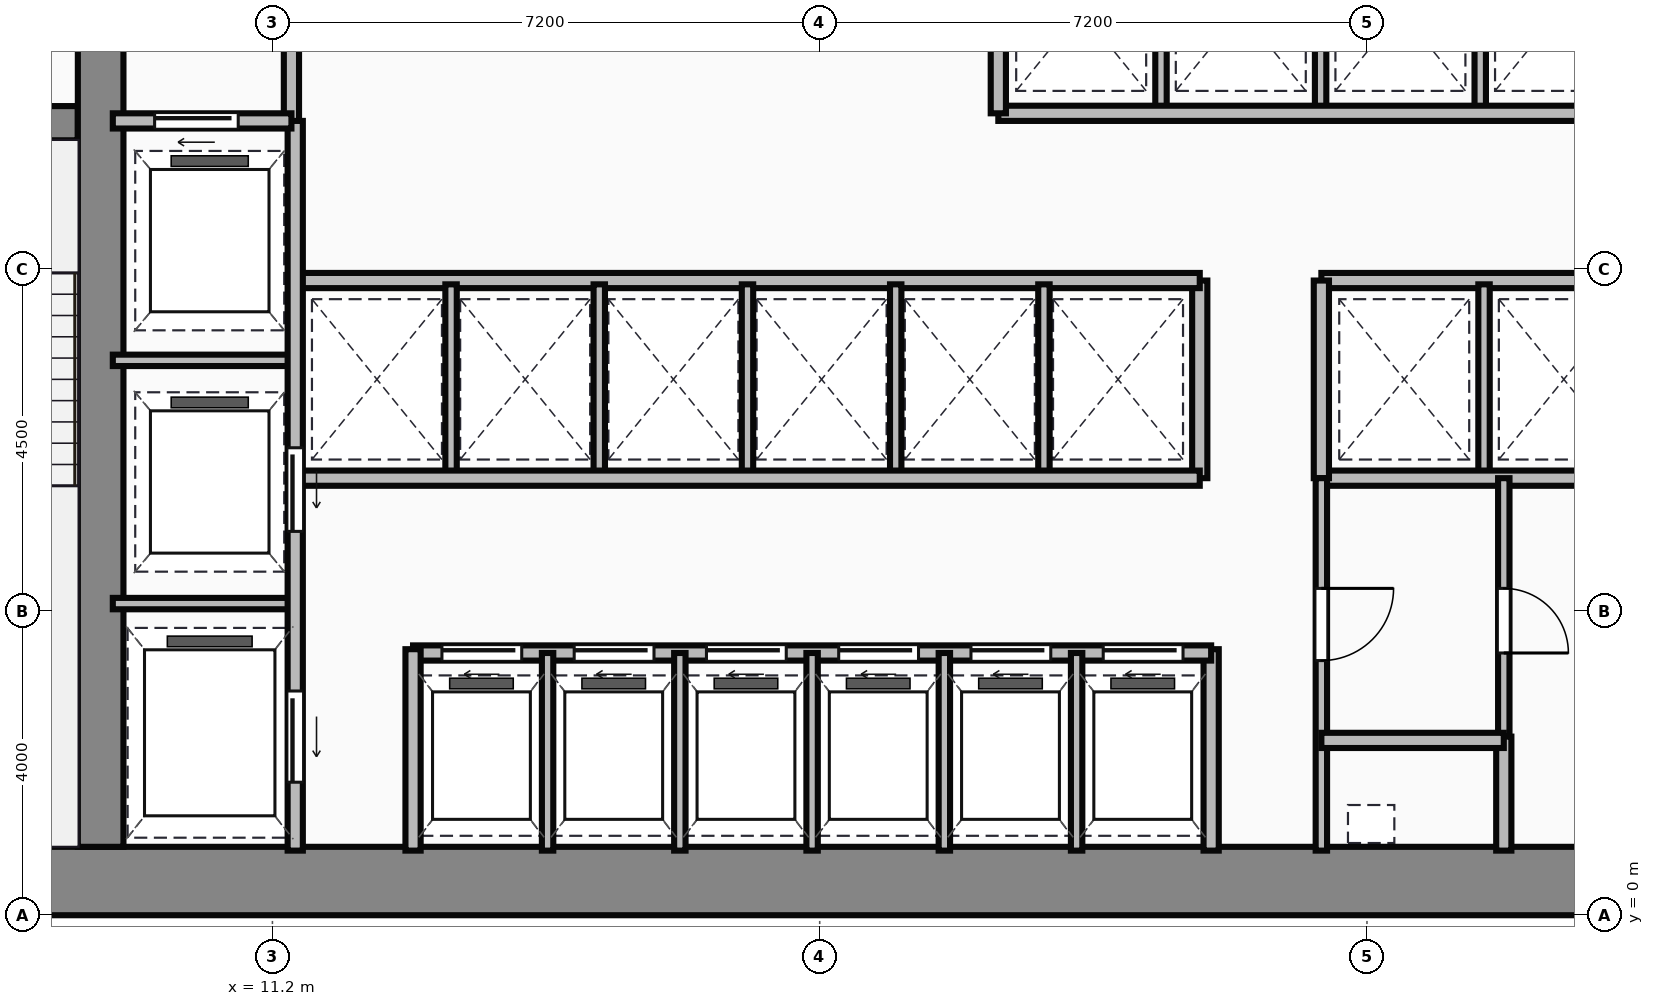
"""IFC4 building model, lengths in metres.
Left out: names, types, materials, properties, quantities, classifications, styles, units other than length and angle.
Written with IfcOpenShell. Run it as: python <this file> out.ifc"""

import sys

from ifc_helpers import new_model, si_unit, direction, frame, frame_2d, origin, place, context, subcontext, project, spatial, rectangle, extrude, source, transform, mapped, element, fill, save


model = new_model("IFC4")
c1 = context("Model", 3, precision=1e-05, world=origin(), true_north=direction((0.0, 1.0)))
c2 = subcontext(c1, "Body", "Model", "MODEL_VIEW")
j1 = project(units=[si_unit("LENGTHUNIT", "METRE"), si_unit("PLANEANGLEUNIT", "RADIAN")], contexts=[c1])
p1 = place(None, origin())
s1 = spatial("IfcSite", under=j1, at=p1, CompositionType="ELEMENT")
p2 = place(p1, origin())
s2 = spatial("IfcBuilding", under=s1, at=p2, CompositionType="ELEMENT")
p3 = place(p2, frame((0.0, 0.0, 36.15)))
s3 = spatial("IfcBuildingStorey", under=s2, at=p3, CompositionType="ELEMENT", Elevation=36.15)
m1 = source(origin(), c2, "Body", "SweptSolid", [
    extrude(rectangle(XDim=29.5, YDim=0.9, at=frame_2d((14.75, 0.0))), origin(), (0.0, 0.0, 1.0), 3.65),
])
p4 = place(p3, frame((4.5, 0.45, 0.0), z_axis=(0.0, 0.0, 1.0), x_axis=(1.0, 0.0, 0.0)))
e1 = element("IfcWall", 1, at=p4, inside=s3, PredefinedType="SHEAR", context=c2, shape_type="MappedRepresentation", body=[
    mapped(m1, transform((0.0, 0.0, 0.0))),
])
m2 = source(origin(), c2, "Body", "SweptSolid", [
    extrude(rectangle(XDim=12.2, YDim=0.6, at=frame_2d((6.1, 0.0))), origin(), (0.0, 0.0, 1.0), 3.65),
])
p5 = place(p3, frame((8.94, 0.9, 0.0), z_axis=(0.0, 0.0, 1.0), x_axis=(0.0, 1.0, 0.0)))
e2 = element("IfcWall", 2, at=p5, inside=s3, PredefinedType="SHEAR", context=c2, shape_type="MappedRepresentation", body=[
    mapped(m2, transform((0.0, 0.0, 0.0))),
])
m3 = source(origin(), c2, "Body", "SweptSolid", [
    extrude(rectangle(XDim=3.39, YDim=0.45, at=frame_2d((1.695, 0.0))), origin(), (0.0, 0.0, 1.0), 3.65),
])
p6 = place(p3, frame((5.25, 10.42, 0.0), z_axis=(0.0, 0.0, 1.0), x_axis=(1.0, 0.0, 0.0)))
e3 = element("IfcWall", 3, at=p6, inside=s3, PredefinedType="SHEAR", context=c2, shape_type="MappedRepresentation", body=[
    mapped(m3, transform((0.0, 0.0, 0.0))),
])
p7 = place(p6, frame((1.05, 0.0, 0.0)))
e4 = element("IfcOpeningElement", 4, at=p7, cuts=e3, PredefinedType="OPENING", context=c2, shape_type="SweptSolid", body=[
    extrude(rectangle(XDim=1.1, YDim=2.15, at=frame_2d((0.55, 1.075))), frame((0.0, 0.235, 0.0), z_axis=(0.0, -1.0, 0.0), x_axis=(1.0, 0.0, 0.0)), (0.0, 0.0, 1.0), 0.47),
])
m4 = source(origin(), c2, "Body", "SweptSolid", [
    extrude(rectangle(XDim=3.18, YDim=0.2, at=frame_2d((1.59, 0.0))), origin(), (0.0, 0.0, 1.0), 3.4),
])
p8 = place(p3, frame((11.45, 10.42, 0.0), z_axis=(0.0, 0.0, 1.0), x_axis=(0.0, 1.0, 0.0)))
e5 = element("IfcWall", 5, at=p8, inside=s3, PredefinedType="PARTITIONING", context=c2, shape_type="MappedRepresentation", body=[
    mapped(m4, transform((0.0, 0.0, 0.0))),
])
m5 = source(origin(), c2, "Body", "SweptSolid", [
    extrude(rectangle(XDim=2.35, YDim=0.2, at=frame_2d((1.175, 0.0))), origin(), (0.0, 0.0, 1.0), 3.4),
])
p9 = place(p3, frame((9.1, 10.45, 0.0), z_axis=(0.0, 0.0, 1.0), x_axis=(1.0, 0.0, 0.0)))
e6 = element("IfcWall", 6, at=p9, inside=s3, PredefinedType="PARTITIONING", context=c2, shape_type="MappedRepresentation", body=[
    mapped(m5, transform((0.0, 0.0, 0.0))),
])
p10 = place(p9, frame((0.55, 0.0, 0.0)))
e7 = element("IfcOpeningElement", 7, at=p10, cuts=e6, PredefinedType="OPENING", context=c2, shape_type="SweptSolid", body=[
    extrude(rectangle(XDim=1.1, YDim=2.15, at=frame_2d((0.55, 1.075))), frame((0.0, 0.11, 0.0), z_axis=(0.0, -1.0, 0.0), x_axis=(1.0, 0.0, 0.0)), (0.0, 0.0, 1.0), 0.22),
])
m6 = source(origin(), c2, "Body", "SweptSolid", [
    extrude(rectangle(XDim=9.6, YDim=0.2, at=frame_2d((4.8, 0.0))), origin(), (0.0, 0.0, 1.0), 3.4),
])
p11 = place(p3, frame((11.5, 0.85, 0.0), z_axis=(0.0, 0.0, 1.0), x_axis=(0.0, 1.0, 0.0)))
e8 = element("IfcWall", 8, at=p11, inside=s3, PredefinedType="PARTITIONING", context=c2, shape_type="MappedRepresentation", body=[
    mapped(m6, transform((0.0, 0.0, 0.0))),
])
p12 = place(p11, frame((4.2, 0.0, 0.0)))
e9 = element("IfcOpeningElement", 9, at=p12, cuts=e8, PredefinedType="OPENING", context=c2, shape_type="SweptSolid", body=[
    extrude(rectangle(XDim=1.1, YDim=2.15, at=frame_2d((0.55, 1.075))), frame((0.0, 0.11, 0.0), z_axis=(0.0, -1.0, 0.0), x_axis=(1.0, 0.0, 0.0)), (0.0, 0.0, 1.0), 0.22),
])
p13 = place(p11, frame((0.9, 0.0, 0.0)))
e10 = element("IfcOpeningElement", 10, at=p13, cuts=e8, PredefinedType="OPENING", context=c2, shape_type="SweptSolid", body=[
    extrude(rectangle(XDim=1.2, YDim=2.15, at=frame_2d((0.6, 1.075))), frame((0.0, 0.11, 0.0), z_axis=(0.0, -1.0, 0.0), x_axis=(1.0, 0.0, 0.0)), (0.0, 0.0, 1.0), 0.22),
])
m7 = source(origin(), c2, "Body", "SweptSolid", [
    extrude(rectangle(XDim=2.4, YDim=0.15, at=frame_2d((1.2, 0.0))), origin(), (0.0, 0.0, 1.0), 3.4),
])
for number, where, z_axis, x_axis in (
    (11, (9.1, 4.1, 0.0), (0.0, 0.0, 1.0), (1.0, 0.0, 0.0)),
    (12, (9.1, 7.3, 0.0), (0.0, 0.0, 1.0), (1.0, 0.0, 0.0)),
):
    element("IfcWall", number, at=place(p3, frame(where, z_axis=z_axis, x_axis=x_axis)), inside=s3, PredefinedType="PARTITIONING", context=c2, shape_type="MappedRepresentation", body=[
        mapped(m7, transform((0.0, 0.0, 0.0))),
    ])
m8 = source(origin(), c2, "Body", "SweptSolid", [
    extrude(rectangle(XDim=2.65, YDim=0.2, at=frame_2d((1.325, 0.0))), origin(), (0.0, 0.0, 1.0), 3.4),
])
p14 = place(p3, frame((13.05, 0.85, 0.0), z_axis=(0.0, 0.0, 1.0), x_axis=(0.0, 1.0, 0.0)))
e13 = element("IfcWall", 13, at=p14, inside=s3, PredefinedType="PARTITIONING", context=c2, shape_type="MappedRepresentation", body=[
    mapped(m8, transform((0.0, 0.0, 0.0))),
])
m9 = source(origin(), c2, "Body", "SweptSolid", [
    extrude(rectangle(XDim=10.5, YDim=0.2, at=frame_2d((5.25, 0.0))), origin(), (0.0, 0.0, 1.0), 3.4),
])
p15 = place(p3, frame((13.05, 3.45, 0.0), z_axis=(0.0, 0.0, 1.0), x_axis=(1.0, 0.0, 0.0)))
e14 = element("IfcWall", 14, at=p15, inside=s3, PredefinedType="PARTITIONING", context=c2, shape_type="MappedRepresentation", body=[
    mapped(m9, transform((0.0, 0.0, 0.0))),
])
p16 = place(p15, frame((0.38, 0.0, 0.0)))
e15 = element("IfcOpeningElement", 15, at=p16, cuts=e14, PredefinedType="OPENING", context=c2, shape_type="SweptSolid", body=[
    extrude(rectangle(XDim=1.05, YDim=2.15, at=frame_2d((0.525, 1.075))), frame((0.0, 0.11, 0.0), z_axis=(0.0, -1.0, 0.0), x_axis=(1.0, 0.0, 0.0)), (0.0, 0.0, 1.0), 0.22),
])
p17 = place(p15, frame((2.12, 0.0, 0.0)))
e16 = element("IfcOpeningElement", 16, at=p17, cuts=e14, PredefinedType="OPENING", context=c2, shape_type="SweptSolid", body=[
    extrude(rectangle(XDim=1.05, YDim=2.15, at=frame_2d((0.525, 1.075))), frame((0.0, 0.11, 0.0), z_axis=(0.0, -1.0, 0.0), x_axis=(1.0, 0.0, 0.0)), (0.0, 0.0, 1.0), 0.22),
])
p18 = place(p15, frame((3.86, 0.0, 0.0)))
e17 = element("IfcOpeningElement", 17, at=p18, cuts=e14, PredefinedType="OPENING", context=c2, shape_type="SweptSolid", body=[
    extrude(rectangle(XDim=1.05, YDim=2.15, at=frame_2d((0.525, 1.075))), frame((0.0, 0.11, 0.0), z_axis=(0.0, -1.0, 0.0), x_axis=(1.0, 0.0, 0.0)), (0.0, 0.0, 1.0), 0.22),
])
p19 = place(p15, frame((5.6, 0.0, 0.0)))
e18 = element("IfcOpeningElement", 18, at=p19, cuts=e14, PredefinedType="OPENING", context=c2, shape_type="SweptSolid", body=[
    extrude(rectangle(XDim=1.05, YDim=2.15, at=frame_2d((0.525, 1.075))), frame((0.0, 0.11, 0.0), z_axis=(0.0, -1.0, 0.0), x_axis=(1.0, 0.0, 0.0)), (0.0, 0.0, 1.0), 0.22),
])
p20 = place(p15, frame((7.34, 0.0, 0.0)))
e19 = element("IfcOpeningElement", 19, at=p20, cuts=e14, PredefinedType="OPENING", context=c2, shape_type="SweptSolid", body=[
    extrude(rectangle(XDim=1.05, YDim=2.15, at=frame_2d((0.525, 1.075))), frame((0.0, 0.11, 0.0), z_axis=(0.0, -1.0, 0.0), x_axis=(1.0, 0.0, 0.0)), (0.0, 0.0, 1.0), 0.22),
])
p21 = place(p15, frame((9.08, 0.0, 0.0)))
e20 = element("IfcOpeningElement", 20, at=p21, cuts=e14, PredefinedType="OPENING", context=c2, shape_type="SweptSolid", body=[
    extrude(rectangle(XDim=1.05, YDim=2.15, at=frame_2d((0.525, 1.075))), frame((0.0, 0.11, 0.0), z_axis=(0.0, -1.0, 0.0), x_axis=(1.0, 0.0, 0.0)), (0.0, 0.0, 1.0), 0.22),
])
p22 = place(p3, frame((23.55, 0.85, 0.0), z_axis=(0.0, 0.0, 1.0), x_axis=(0.0, 1.0, 0.0)))
e21 = element("IfcWall", 21, at=p22, inside=s3, PredefinedType="PARTITIONING", context=c2, shape_type="MappedRepresentation", body=[
    mapped(m8, transform((0.0, 0.0, 0.0))),
])
m10 = source(origin(), c2, "Body", "SweptSolid", [
    extrude(rectangle(XDim=2.6, YDim=0.15, at=frame_2d((1.3, 0.0))), origin(), (0.0, 0.0, 1.0), 3.4),
])
for number, where, z_axis, x_axis in (
    (22, (14.82, 0.85, 0.0), (0.0, 0.0, 1.0), (0.0, 1.0, 0.0)),
    (23, (16.56, 0.85, 0.0), (0.0, 0.0, 1.0), (0.0, 1.0, 0.0)),
    (24, (18.3, 0.85, 0.0), (0.0, 0.0, 1.0), (0.0, 1.0, 0.0)),
    (25, (20.04, 0.85, 0.0), (0.0, 0.0, 1.0), (0.0, 1.0, 0.0)),
    (26, (21.78, 0.85, 0.0), (0.0, 0.0, 1.0), (0.0, 1.0, 0.0)),
):
    element("IfcWall", number, at=place(p3, frame(where, z_axis=z_axis, x_axis=x_axis)), inside=s3, PredefinedType="PARTITIONING", context=c2, shape_type="MappedRepresentation", body=[
        mapped(m10, transform((0.0, 0.0, 0.0))),
    ])
m11 = source(origin(), c2, "Body", "SweptSolid", [
    extrude(rectangle(XDim=11.85, YDim=0.2, at=frame_2d((5.925, 0.0))), origin(), (0.0, 0.0, 1.0), 3.4),
])
for number, where, z_axis, x_axis in (
    (27, (11.55, 5.75, 0.0), (0.0, 0.0, 1.0), (1.0, 0.0, 0.0)),
    (28, (11.55, 8.35, 0.0), (0.0, 0.0, 1.0), (1.0, 0.0, 0.0)),
):
    element("IfcWall", number, at=place(p3, frame(where, z_axis=z_axis, x_axis=x_axis)), inside=s3, PredefinedType="PARTITIONING", context=c2, shape_type="MappedRepresentation", body=[
        mapped(m11, transform((0.0, 0.0, 0.0))),
    ])
m12 = source(origin(), c2, "Body", "SweptSolid", [
    extrude(rectangle(XDim=2.6, YDim=0.2, at=frame_2d((1.3, 0.0))), origin(), (0.0, 0.0, 1.0), 3.4),
])
p23 = place(p3, frame((23.4, 5.75, 0.0), z_axis=(0.0, 0.0, 1.0), x_axis=(0.0, 1.0, 0.0)))
e29 = element("IfcWall", 29, at=p23, inside=s3, PredefinedType="PARTITIONING", context=c2, shape_type="MappedRepresentation", body=[
    mapped(m12, transform((0.0, 0.0, 0.0))),
])
m13 = source(origin(), c2, "Body", "SweptSolid", [
    extrude(rectangle(XDim=2.5, YDim=0.15, at=frame_2d((1.25, 0.0))), origin(), (0.0, 0.0, 1.0), 3.4),
])
for number, where, z_axis, x_axis in (
    (30, (13.55, 5.8, 0.0), (0.0, 0.0, 1.0), (0.0, 1.0, 0.0)),
    (31, (15.5, 5.8, 0.0), (0.0, 0.0, 1.0), (0.0, 1.0, 0.0)),
    (32, (17.45, 5.8, 0.0), (0.0, 0.0, 1.0), (0.0, 1.0, 0.0)),
    (33, (19.4, 5.8, 0.0), (0.0, 0.0, 1.0), (0.0, 1.0, 0.0)),
    (34, (21.35, 5.8, 0.0), (0.0, 0.0, 1.0), (0.0, 1.0, 0.0)),
):
    element("IfcWall", number, at=place(p3, frame(where, z_axis=z_axis, x_axis=x_axis)), inside=s3, PredefinedType="PARTITIONING", context=c2, shape_type="MappedRepresentation", body=[
        mapped(m13, transform((0.0, 0.0, 0.0))),
    ])
m14 = source(origin(), c2, "Body", "SweptSolid", [
    extrude(rectangle(XDim=8.8, YDim=0.2, at=frame_2d((4.4, 0.0))), origin(), (0.0, 0.0, 1.0), 3.4),
])
p24 = place(p3, frame((20.75, 10.55, 0.0), z_axis=(0.0, 0.0, 1.0), x_axis=(1.0, 0.0, 0.0)))
e35 = element("IfcWall", 35, at=p24, inside=s3, PredefinedType="PARTITIONING", context=c2, shape_type="MappedRepresentation", body=[
    mapped(m14, transform((0.0, 0.0, 0.0))),
])
m15 = source(origin(), c2, "Body", "SweptSolid", [
    extrude(rectangle(XDim=3.0, YDim=0.2, at=frame_2d((1.5, 0.0))), origin(), (0.0, 0.0, 1.0), 3.4),
])
p25 = place(p3, frame((20.75, 10.55, 0.0), z_axis=(0.0, 0.0, 1.0), x_axis=(0.0, 1.0, 0.0)))
e36 = element("IfcWall", 36, at=p25, inside=s3, PredefinedType="PARTITIONING", context=c2, shape_type="MappedRepresentation", body=[
    mapped(m15, transform((0.0, 0.0, 0.0))),
])
m16 = source(origin(), c2, "Body", "SweptSolid", [
    extrude(rectangle(XDim=2.85, YDim=0.15, at=frame_2d((1.425, 0.0))), origin(), (0.0, 0.0, 1.0), 3.4),
])
for number, where, z_axis, x_axis in (
    (37, (22.89, 10.6, 0.0), (0.0, 0.0, 1.0), (0.0, 1.0, 0.0)),
    (38, (24.99, 10.6, 0.0), (0.0, 0.0, 1.0), (0.0, 1.0, 0.0)),
    (39, (27.09, 10.6, 0.0), (0.0, 0.0, 1.0), (0.0, 1.0, 0.0)),
):
    element("IfcWall", number, at=place(p3, frame(where, z_axis=z_axis, x_axis=x_axis)), inside=s3, PredefinedType="PARTITIONING", context=c2, shape_type="MappedRepresentation", body=[
        mapped(m16, transform((0.0, 0.0, 0.0))),
    ])
m17 = source(origin(), c2, "Body", "SweptSolid", [
    extrude(rectangle(XDim=4.55, YDim=0.2, at=frame_2d((2.275, 0.0))), origin(), (0.0, 0.0, 1.0), 3.4),
])
for number, where, z_axis, x_axis in (
    (40, (25.0, 8.35, 0.0), (0.0, 0.0, 1.0), (1.0, 0.0, 0.0)),
    (41, (25.0, 5.75, 0.0), (0.0, 0.0, 1.0), (1.0, 0.0, 0.0)),
):
    element("IfcWall", number, at=place(p3, frame(where, z_axis=z_axis, x_axis=x_axis)), inside=s3, PredefinedType="PARTITIONING", context=c2, shape_type="MappedRepresentation", body=[
        mapped(m17, transform((0.0, 0.0, 0.0))),
    ])
p26 = place(p3, frame((25.0, 5.75, 0.0), z_axis=(0.0, 0.0, 1.0), x_axis=(0.0, 1.0, 0.0)))
e42 = element("IfcWall", 42, at=p26, inside=s3, PredefinedType="PARTITIONING", context=c2, shape_type="MappedRepresentation", body=[
    mapped(m12, transform((0.0, 0.0, 0.0))),
])
p27 = place(p3, frame((27.14, 5.8, 0.0), z_axis=(0.0, 0.0, 1.0), x_axis=(0.0, 1.0, 0.0)))
e43 = element("IfcWall", 43, at=p27, inside=s3, PredefinedType="PARTITIONING", context=c2, shape_type="MappedRepresentation", body=[
    mapped(m13, transform((0.0, 0.0, 0.0))),
])
m18 = source(origin(), c2, "Body", "SweptSolid", [
    extrude(rectangle(XDim=4.9, YDim=0.15, at=frame_2d((2.45, 0.0))), origin(), (0.0, 0.0, 1.0), 3.4),
])
p28 = place(p3, frame((25.0, 0.85, 0.0), z_axis=(0.0, 0.0, 1.0), x_axis=(0.0, 1.0, 0.0)))
e44 = element("IfcWall", 44, at=p28, inside=s3, PredefinedType="PARTITIONING", context=c2, shape_type="MappedRepresentation", body=[
    mapped(m18, transform((0.0, 0.0, 0.0))),
])
p29 = place(p28, frame((2.5, 0.0, 0.0)))
e45 = element("IfcOpeningElement", 45, at=p29, cuts=e44, PredefinedType="OPENING", context=c2, shape_type="SweptSolid", body=[
    extrude(rectangle(XDim=0.95, YDim=2.15, at=frame_2d((0.475, 1.075))), frame((0.0, 0.085, 0.0), z_axis=(0.0, -1.0, 0.0), x_axis=(1.0, 0.0, 0.0)), (0.0, 0.0, 1.0), 0.17),
])
m19 = source(origin(), c2, "Body", "SweptSolid", [
    extrude(rectangle(XDim=2.4, YDim=0.2, at=frame_2d((1.2, 0.0))), origin(), (0.0, 0.0, 1.0), 3.4),
])
p30 = place(p3, frame((25.0, 2.3, 0.0), z_axis=(0.0, 0.0, 1.0), x_axis=(1.0, 0.0, 0.0)))
e46 = element("IfcWall", 46, at=p30, inside=s3, PredefinedType="PARTITIONING", context=c2, shape_type="MappedRepresentation", body=[
    mapped(m19, transform((0.0, 0.0, 0.0))),
])
m20 = source(origin(), c2, "Body", "SweptSolid", [
    extrude(rectangle(XDim=1.5, YDim=0.2, at=frame_2d((0.75, 0.0))), origin(), (0.0, 0.0, 1.0), 3.4),
])
p31 = place(p3, frame((27.4, 0.85, 0.0), z_axis=(0.0, 0.0, 1.0), x_axis=(0.0, 1.0, 0.0)))
e47 = element("IfcWall", 47, at=p31, inside=s3, PredefinedType="PARTITIONING", context=c2, shape_type="MappedRepresentation", body=[
    mapped(m20, transform((0.0, 0.0, 0.0))),
])
m21 = source(origin(), c2, "Body", "SweptSolid", [
    extrude(rectangle(XDim=3.4, YDim=0.15, at=frame_2d((1.7, 0.0))), origin(), (0.0, 0.0, 1.0), 3.4),
])
p32 = place(p3, frame((27.4, 2.35, 0.0), z_axis=(0.0, 0.0, 1.0), x_axis=(0.0, 1.0, 0.0)))
e48 = element("IfcWall", 48, at=p32, inside=s3, PredefinedType="PARTITIONING", context=c2, shape_type="MappedRepresentation", body=[
    mapped(m21, transform((0.0, 0.0, 0.0))),
])
p33 = place(p32, frame((1.1, 0.0, 0.0)))
e49 = element("IfcOpeningElement", 49, at=p33, cuts=e48, PredefinedType="OPENING", context=c2, shape_type="SweptSolid", body=[
    extrude(rectangle(XDim=0.85, YDim=2.1, at=frame_2d((0.425, 1.05))), frame((0.0, 0.085, 0.0), z_axis=(0.0, -1.0, 0.0), x_axis=(1.0, 0.0, 0.0)), (0.0, 0.0, 1.0), 0.17),
])
m22 = source(origin(), c2, "Body", "SweptSolid", [
    extrude(rectangle(XDim=1.1, YDim=2.15, at=frame_2d((0.55, 1.075))), frame((0.0, 0.025, 0.0), z_axis=(0.0, -1.0, 0.0), x_axis=(1.0, 0.0, 0.0)), (0.0, 0.0, 1.0), 0.05),
])
p34 = place(p10, origin())
e50 = element("IfcDoor", 50, at=p34, inside=s3, OperationType="SLIDING_TO_LEFT", PredefinedType="DOOR", context=c2, shape_type="MappedRepresentation", body=[
    mapped(m22, transform((0.0, 0.0, 0.0))),
])
fill(e7, e50)
p35 = place(p12, frame((1.1, 0.0, 0.0), z_axis=(0.0, 0.0, 1.0), x_axis=(-1.0, 0.0, 0.0)))
e51 = element("IfcDoor", 51, at=p35, inside=s3, OperationType="SLIDING_TO_LEFT", PredefinedType="DOOR", context=c2, shape_type="MappedRepresentation", body=[
    mapped(m22, transform((0.0, 0.0, 0.0))),
])
fill(e9, e51)
m23 = source(origin(), c2, "Body", "SweptSolid", [
    extrude(rectangle(XDim=1.2, YDim=2.15, at=frame_2d((0.6, 1.075))), frame((0.0, 0.025, 0.0), z_axis=(0.0, -1.0, 0.0), x_axis=(1.0, 0.0, 0.0)), (0.0, 0.0, 1.0), 0.05),
])
p36 = place(p13, frame((1.2, 0.0, 0.0), z_axis=(0.0, 0.0, 1.0), x_axis=(-1.0, 0.0, 0.0)))
e52 = element("IfcDoor", 52, at=p36, inside=s3, OperationType="SLIDING_TO_LEFT", PredefinedType="DOOR", context=c2, shape_type="MappedRepresentation", body=[
    mapped(m23, transform((0.0, 0.0, 0.0))),
])
fill(e10, e52)
m24 = source(origin(), c2, "Body", "SweptSolid", [
    extrude(rectangle(XDim=1.05, YDim=2.15, at=frame_2d((0.525, 1.075))), frame((0.0, 0.025, 0.0), z_axis=(0.0, -1.0, 0.0), x_axis=(1.0, 0.0, 0.0)), (0.0, 0.0, 1.0), 0.05),
])
p37 = place(p16, origin())
e53 = element("IfcDoor", 53, at=p37, inside=s3, OperationType="SLIDING_TO_LEFT", PredefinedType="DOOR", context=c2, shape_type="MappedRepresentation", body=[
    mapped(m24, transform((0.0, 0.0, 0.0))),
])
fill(e15, e53)
p38 = place(p17, origin())
e54 = element("IfcDoor", 54, at=p38, inside=s3, OperationType="SLIDING_TO_LEFT", PredefinedType="DOOR", context=c2, shape_type="MappedRepresentation", body=[
    mapped(m24, transform((0.0, 0.0, 0.0))),
])
fill(e16, e54)
p39 = place(p18, origin())
e55 = element("IfcDoor", 55, at=p39, inside=s3, OperationType="SLIDING_TO_LEFT", PredefinedType="DOOR", context=c2, shape_type="MappedRepresentation", body=[
    mapped(m24, transform((0.0, 0.0, 0.0))),
])
fill(e17, e55)
p40 = place(p19, origin())
e56 = element("IfcDoor", 56, at=p40, inside=s3, OperationType="SLIDING_TO_LEFT", PredefinedType="DOOR", context=c2, shape_type="MappedRepresentation", body=[
    mapped(m24, transform((0.0, 0.0, 0.0))),
])
fill(e18, e56)
p41 = place(p20, origin())
e57 = element("IfcDoor", 57, at=p41, inside=s3, OperationType="SLIDING_TO_LEFT", PredefinedType="DOOR", context=c2, shape_type="MappedRepresentation", body=[
    mapped(m24, transform((0.0, 0.0, 0.0))),
])
fill(e19, e57)
p42 = place(p21, origin())
e58 = element("IfcDoor", 58, at=p42, inside=s3, OperationType="SLIDING_TO_LEFT", PredefinedType="DOOR", context=c2, shape_type="MappedRepresentation", body=[
    mapped(m24, transform((0.0, 0.0, 0.0))),
])
fill(e20, e58)
m25 = source(origin(), c2, "Body", "SweptSolid", [
    extrude(rectangle(XDim=0.95, YDim=2.15, at=frame_2d((0.475, 1.075))), frame((0.0, 0.025, 0.0), z_axis=(0.0, -1.0, 0.0), x_axis=(1.0, 0.0, 0.0)), (0.0, 0.0, 1.0), 0.05),
])
p43 = place(p29, origin())
e59 = element("IfcDoor", 59, at=p43, inside=s3, OperationType="SINGLE_SWING_RIGHT", PredefinedType="DOOR", context=c2, shape_type="MappedRepresentation", body=[
    mapped(m25, transform((0.0, 0.0, 0.0))),
])
fill(e45, e59)
m26 = source(origin(), c2, "Body", "SweptSolid", [
    extrude(rectangle(XDim=0.85, YDim=2.1, at=frame_2d((0.425, 1.05))), frame((0.0, 0.025, 0.0), z_axis=(0.0, -1.0, 0.0), x_axis=(1.0, 0.0, 0.0)), (0.0, 0.0, 1.0), 0.05),
])
p44 = place(p33, frame((0.85, 0.0, 0.0), z_axis=(0.0, 0.0, 1.0), x_axis=(-1.0, 0.0, 0.0)))
e60 = element("IfcDoor", 60, at=p44, inside=s3, OperationType="SINGLE_SWING_LEFT", PredefinedType="DOOR", context=c2, shape_type="MappedRepresentation", body=[
    mapped(m26, transform((0.0, 0.0, 0.0))),
])
fill(e49, e60)
save(model, sys.argv[1])
